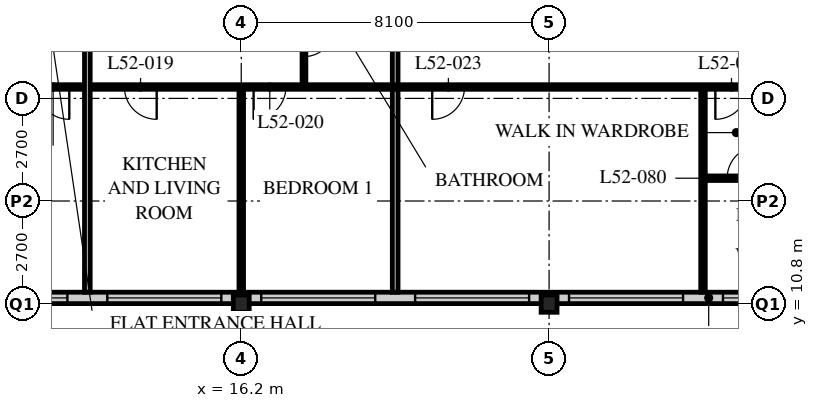
"""IFC4 building model, lengths in metres.
Left out: names, types, materials, properties, quantities, classifications, styles, units other than length and angle.
Written with IfcOpenShell. Run it as: python <this file> out.ifc"""

import sys

from ifc_helpers import new_model, si_unit, direction, frame, frame_2d, origin, origin_2d, place, context, subcontext, project, spatial, rectangle, i_section, extrude, element, fill, save


model = new_model("IFC4")
c1 = context("Model", 3, precision=1e-05, world=origin(), true_north=direction((0.0, 1.0)))
c2 = subcontext(c1, "Body", "Model", "MODEL_VIEW")
j1 = project(units=[si_unit("LENGTHUNIT", "METRE"), si_unit("PLANEANGLEUNIT", "RADIAN")], contexts=[c1])
p1 = place(None, origin())
s1 = spatial("IfcSite", under=j1, at=p1, CompositionType="ELEMENT")
p2 = place(p1, origin())
s2 = spatial("IfcBuilding", under=s1, at=p2, CompositionType="ELEMENT")
p3 = place(p2, frame((0.0, 0.0, 202.8)))
s3 = spatial("IfcBuildingStorey", under=s2, at=p3, CompositionType="ELEMENT", Elevation=202.8)
for number, where, z_axis, x_axis in (
    (1, (16.2, 10.8, 0.0), (0.0, 0.0, 1.0), (1.0, 0.0, 0.0)),
    (2, (24.3, 10.8, 0.0), (0.0, 0.0, 1.0), (1.0, 0.0, 0.0)),
):
    element("IfcColumn", number, at=place(p3, frame(where, z_axis=z_axis, x_axis=x_axis)), inside=s3, PredefinedType="COLUMN", context=c2, shape_type="SweptSolid", body=[
        extrude(i_section(OverallWidth=0.418, OverallDepth=0.456, WebThickness=0.042, FlangeThickness=0.067, FilletRadius=0.015, at=origin_2d()), origin(), (0.0, 0.0, 1.0), 3.6),
    ])
p4 = place(p3, frame((8.4, 10.95, 0.0), z_axis=(0.0, 0.0, 1.0), x_axis=(1.0, 0.0, 0.0)))
e3 = element("IfcWall", 3, at=p4, inside=s3, PredefinedType="SOLIDWALL", context=c2, shape_type="SweptSolid", body=[
    extrude(rectangle(XDim=40.2, YDim=0.3, at=frame_2d((20.1, 0.0))), origin(), (0.0, 0.0, 1.0), 3.39),
])
p5 = place(p4, frame((0.225, 0.0, 0.6)))
e4 = element("IfcOpeningElement", 4, at=p5, cuts=e3, PredefinedType="OPENING", context=c2, shape_type="SweptSolid", body=[
    extrude(rectangle(XDim=3.0, YDim=2.4, at=frame_2d((1.5, 1.2))), frame((0.0, 0.16, 0.0), z_axis=(0.0, -1.0, 0.0), x_axis=(1.0, 0.0, 0.0)), (0.0, 0.0, 1.0), 0.32),
])
p6 = place(p4, frame((4.275, 0.0, 0.6)))
e5 = element("IfcOpeningElement", 5, at=p6, cuts=e3, PredefinedType="OPENING", context=c2, shape_type="SweptSolid", body=[
    extrude(rectangle(XDim=3.0, YDim=2.4, at=frame_2d((1.5, 1.2))), frame((0.0, 0.16, 0.0), z_axis=(0.0, -1.0, 0.0), x_axis=(1.0, 0.0, 0.0)), (0.0, 0.0, 1.0), 0.32),
])
p7 = place(p4, frame((8.325, 0.0, 0.6)))
e6 = element("IfcOpeningElement", 6, at=p7, cuts=e3, PredefinedType="OPENING", context=c2, shape_type="SweptSolid", body=[
    extrude(rectangle(XDim=3.0, YDim=2.4, at=frame_2d((1.5, 1.2))), frame((0.0, 0.16, 0.0), z_axis=(0.0, -1.0, 0.0), x_axis=(1.0, 0.0, 0.0)), (0.0, 0.0, 1.0), 0.32),
])
p8 = place(p4, frame((12.375, 0.0, 0.6)))
e7 = element("IfcOpeningElement", 7, at=p8, cuts=e3, PredefinedType="OPENING", context=c2, shape_type="SweptSolid", body=[
    extrude(rectangle(XDim=3.0, YDim=2.4, at=frame_2d((1.5, 1.2))), frame((0.0, 0.16, 0.0), z_axis=(0.0, -1.0, 0.0), x_axis=(1.0, 0.0, 0.0)), (0.0, 0.0, 1.0), 0.32),
])
p9 = place(p4, frame((16.425, 0.0, 0.6)))
e8 = element("IfcOpeningElement", 8, at=p9, cuts=e3, PredefinedType="OPENING", context=c2, shape_type="SweptSolid", body=[
    extrude(rectangle(XDim=3.0, YDim=2.4, at=frame_2d((1.5, 1.2))), frame((0.0, 0.16, 0.0), z_axis=(0.0, -1.0, 0.0), x_axis=(1.0, 0.0, 0.0)), (0.0, 0.0, 1.0), 0.32),
])
p10 = place(p4, frame((20.475, 0.0, 0.6)))
e9 = element("IfcOpeningElement", 9, at=p10, cuts=e3, PredefinedType="OPENING", context=c2, shape_type="SweptSolid", body=[
    extrude(rectangle(XDim=3.0, YDim=2.4, at=frame_2d((1.5, 1.2))), frame((0.0, 0.16, 0.0), z_axis=(0.0, -1.0, 0.0), x_axis=(1.0, 0.0, 0.0)), (0.0, 0.0, 1.0), 0.32),
])
p11 = place(p4, frame((24.525, 0.0, 0.6)))
e10 = element("IfcOpeningElement", 10, at=p11, cuts=e3, PredefinedType="OPENING", context=c2, shape_type="SweptSolid", body=[
    extrude(rectangle(XDim=3.0, YDim=2.4, at=frame_2d((1.5, 1.2))), frame((0.0, 0.16, 0.0), z_axis=(0.0, -1.0, 0.0), x_axis=(1.0, 0.0, 0.0)), (0.0, 0.0, 1.0), 0.32),
])
p12 = place(p4, frame((28.575, 0.0, 0.6)))
e11 = element("IfcOpeningElement", 11, at=p12, cuts=e3, PredefinedType="OPENING", context=c2, shape_type="SweptSolid", body=[
    extrude(rectangle(XDim=3.0, YDim=2.4, at=frame_2d((1.5, 1.2))), frame((0.0, 0.16, 0.0), z_axis=(0.0, -1.0, 0.0), x_axis=(1.0, 0.0, 0.0)), (0.0, 0.0, 1.0), 0.32),
])
p13 = place(p4, frame((32.625, 0.0, 0.6)))
e12 = element("IfcOpeningElement", 12, at=p13, cuts=e3, PredefinedType="OPENING", context=c2, shape_type="SweptSolid", body=[
    extrude(rectangle(XDim=3.0, YDim=2.4, at=frame_2d((1.5, 1.2))), frame((0.0, 0.16, 0.0), z_axis=(0.0, -1.0, 0.0), x_axis=(1.0, 0.0, 0.0)), (0.0, 0.0, 1.0), 0.32),
])
p14 = place(p4, frame((36.675, 0.0, 0.6)))
e13 = element("IfcOpeningElement", 13, at=p14, cuts=e3, PredefinedType="OPENING", context=c2, shape_type="SweptSolid", body=[
    extrude(rectangle(XDim=3.0, YDim=2.4, at=frame_2d((1.5, 1.2))), frame((0.0, 0.16, 0.0), z_axis=(0.0, -1.0, 0.0), x_axis=(1.0, 0.0, 0.0)), (0.0, 0.0, 1.0), 0.32),
])
p15 = place(p3, frame((17.85, 18.9, 0.0), z_axis=(0.0, 0.0, 1.0), x_axis=(0.0, -1.0, 0.0)))
e14 = element("IfcWall", 14, at=p15, inside=s3, PredefinedType="PARTITIONING", context=c2, shape_type="SweptSolid", body=[
    extrude(rectangle(XDim=2.4, YDim=0.1, at=frame_2d((1.2, 0.0))), origin(), (0.0, 0.0, 1.0), 3.39),
])
p16 = place(p15, frame((0.8, 0.0, 0.0)))
e15 = element("IfcOpeningElement", 15, at=p16, cuts=e14, PredefinedType="OPENING", context=c2, shape_type="SweptSolid", body=[
    extrude(rectangle(XDim=0.8, YDim=2.1, at=frame_2d((0.4, 1.05))), frame((0.0, 0.06, 0.0), z_axis=(0.0, -1.0, 0.0), x_axis=(1.0, 0.0, 0.0)), (0.0, 0.0, 1.0), 0.12),
])
p17 = place(p3, frame((16.2, 16.5, 0.0), z_axis=(0.0, 0.0, 1.0), x_axis=(0.0, -1.0, 0.0)))
e16 = element("IfcWall", 16, at=p17, inside=s3, PredefinedType="PARTITIONING", context=c2, shape_type="SweptSolid", body=[
    extrude(rectangle(XDim=5.4, YDim=0.12, at=frame_2d((2.7, 0.0))), origin(), (0.0, 0.0, 1.0), 2.778),
])
p18 = place(p3, frame((20.25, 18.9, 0.0), z_axis=(0.0, 0.0, 1.0), x_axis=(0.0, -1.0, 0.0)))
e17 = element("IfcWall", 17, at=p18, inside=s3, PredefinedType="PARTITIONING", context=c2, shape_type="SweptSolid", body=[
    extrude(rectangle(XDim=7.8, YDim=0.15, at=frame_2d((3.9, 0.0))), origin(), (0.0, 0.0, 1.0), 3.39),
])
p19 = place(p3, frame((28.35, 16.5, 0.0), z_axis=(0.0, 0.0, 1.0), x_axis=(0.0, -1.0, 0.0)))
e18 = element("IfcWall", 18, at=p19, inside=s3, PredefinedType="PARTITIONING", context=c2, shape_type="SweptSolid", body=[
    extrude(rectangle(XDim=5.4, YDim=0.12, at=frame_2d((2.7, 0.0))), origin(), (0.0, 0.0, 1.0), 3.39),
])
p20 = place(p3, frame((8.1, 16.5, 0.0), z_axis=(0.0, 0.0, 1.0), x_axis=(1.0, 0.0, 0.0)))
e19 = element("IfcWall", 19, at=p20, inside=s3, PredefinedType="PARTITIONING", context=c2, shape_type="SweptSolid", body=[
    extrude(rectangle(XDim=28.35, YDim=0.12, at=frame_2d((14.175, 0.0))), origin(), (0.0, 0.0, 1.0), 3.39),
])
p21 = place(p20, frame((5.025, 0.0, 0.0)))
e20 = element("IfcOpeningElement", 20, at=p21, cuts=e19, PredefinedType="OPENING", context=c2, shape_type="SweptSolid", body=[
    extrude(rectangle(XDim=0.85, YDim=2.1, at=frame_2d((0.425, 1.05))), frame((0.0, 0.07, 0.0), z_axis=(0.0, -1.0, 0.0), x_axis=(1.0, 0.0, 0.0)), (0.0, 0.0, 1.0), 0.14),
])
p22 = place(p20, frame((8.425, 0.0, 0.0)))
e21 = element("IfcOpeningElement", 21, at=p22, cuts=e19, PredefinedType="OPENING", context=c2, shape_type="SweptSolid", body=[
    extrude(rectangle(XDim=0.85, YDim=2.1, at=frame_2d((0.425, 1.05))), frame((0.0, 0.07, 0.0), z_axis=(0.0, -1.0, 0.0), x_axis=(1.0, 0.0, 0.0)), (0.0, 0.0, 1.0), 0.14),
])
p23 = place(p20, frame((13.125, 0.0, 0.0)))
e22 = element("IfcOpeningElement", 22, at=p23, cuts=e19, PredefinedType="OPENING", context=c2, shape_type="SweptSolid", body=[
    extrude(rectangle(XDim=0.85, YDim=2.1, at=frame_2d((0.425, 1.05))), frame((0.0, 0.07, 0.0), z_axis=(0.0, -1.0, 0.0), x_axis=(1.0, 0.0, 0.0)), (0.0, 0.0, 1.0), 0.14),
])
p24 = place(p20, frame((20.575, 0.0, 0.0)))
e23 = element("IfcOpeningElement", 23, at=p24, cuts=e19, PredefinedType="OPENING", context=c2, shape_type="SweptSolid", body=[
    extrude(rectangle(XDim=0.85, YDim=2.1, at=frame_2d((0.425, 1.05))), frame((0.0, 0.07, 0.0), z_axis=(0.0, -1.0, 0.0), x_axis=(1.0, 0.0, 0.0)), (0.0, 0.0, 1.0), 0.14),
])
p25 = place(p20, frame((24.625, 0.0, 0.0)))
e24 = element("IfcOpeningElement", 24, at=p25, cuts=e19, PredefinedType="OPENING", context=c2, shape_type="SweptSolid", body=[
    extrude(rectangle(XDim=0.85, YDim=2.1, at=frame_2d((0.425, 1.05))), frame((0.0, 0.07, 0.0), z_axis=(0.0, -1.0, 0.0), x_axis=(1.0, 0.0, 0.0)), (0.0, 0.0, 1.0), 0.14),
])
p26 = place(p20, frame((2.725, 0.0, 0.0)))
e25 = element("IfcOpeningElement", 25, at=p26, cuts=e19, PredefinedType="OPENING", context=c2, shape_type="SweptSolid", body=[
    extrude(rectangle(XDim=0.85, YDim=2.1, at=frame_2d((0.425, 1.05))), frame((0.0, 0.07, 0.0), z_axis=(0.0, -1.0, 0.0), x_axis=(1.0, 0.0, 0.0)), (0.0, 0.0, 1.0), 0.14),
])
p27 = place(p3, frame((12.15, 18.9, 0.0), z_axis=(0.0, 0.0, 1.0), x_axis=(0.0, -1.0, 0.0)))
e26 = element("IfcWall", 26, at=p27, inside=s3, PredefinedType="PARTITIONING", context=c2, shape_type="SweptSolid", body=[
    extrude(rectangle(XDim=7.8, YDim=0.15, at=frame_2d((3.9, 0.0))), origin(), (0.0, 0.0, 1.0), 3.39),
])
p28 = place(p3, frame((30.11, 14.1, 0.0), z_axis=(0.0, 0.0, 1.0), x_axis=(-1.0, 0.0, 0.0)))
e27 = element("IfcWall", 27, at=p28, inside=s3, PredefinedType="PARTITIONING", context=c2, shape_type="SweptSolid", body=[
    extrude(rectangle(XDim=1.76, YDim=0.12, at=frame_2d((0.88, 0.0))), origin(), (0.0, 0.0, 1.0), 3.39),
])
p29 = place(p28, frame((0.275, 0.0, 0.0)))
e28 = element("IfcOpeningElement", 28, at=p29, cuts=e27, PredefinedType="OPENING", context=c2, shape_type="SweptSolid", body=[
    extrude(rectangle(XDim=0.85, YDim=2.1, at=frame_2d((0.425, 1.05))), frame((0.0, 0.07, 0.0), z_axis=(0.0, -1.0, 0.0), x_axis=(1.0, 0.0, 0.0)), (0.0, 0.0, 1.0), 0.14),
])
p30 = place(p5, origin())
e29 = element("IfcWindow", 29, at=p30, inside=s3, PartitioningType="SINGLE_PANEL", PredefinedType="WINDOW", context=c2, shape_type="SweptSolid", body=[
    extrude(rectangle(XDim=3.0, YDim=2.4, at=frame_2d((1.5, 1.2))), frame((0.0, 0.03, 0.0), z_axis=(0.0, -1.0, 0.0), x_axis=(1.0, 0.0, 0.0)), (0.0, 0.0, 1.0), 0.06),
])
fill(e4, e29)
p31 = place(p6, origin())
e30 = element("IfcWindow", 30, at=p31, inside=s3, PartitioningType="SINGLE_PANEL", PredefinedType="WINDOW", context=c2, shape_type="SweptSolid", body=[
    extrude(rectangle(XDim=3.0, YDim=2.4, at=frame_2d((1.5, 1.2))), frame((0.0, 0.03, 0.0), z_axis=(0.0, -1.0, 0.0), x_axis=(1.0, 0.0, 0.0)), (0.0, 0.0, 1.0), 0.06),
])
fill(e5, e30)
p32 = place(p7, origin())
e31 = element("IfcWindow", 31, at=p32, inside=s3, PartitioningType="SINGLE_PANEL", PredefinedType="WINDOW", context=c2, shape_type="SweptSolid", body=[
    extrude(rectangle(XDim=3.0, YDim=2.4, at=frame_2d((1.5, 1.2))), frame((0.0, 0.03, 0.0), z_axis=(0.0, -1.0, 0.0), x_axis=(1.0, 0.0, 0.0)), (0.0, 0.0, 1.0), 0.06),
])
fill(e6, e31)
p33 = place(p8, origin())
e32 = element("IfcWindow", 32, at=p33, inside=s3, PartitioningType="SINGLE_PANEL", PredefinedType="WINDOW", context=c2, shape_type="SweptSolid", body=[
    extrude(rectangle(XDim=3.0, YDim=2.4, at=frame_2d((1.5, 1.2))), frame((0.0, 0.03, 0.0), z_axis=(0.0, -1.0, 0.0), x_axis=(1.0, 0.0, 0.0)), (0.0, 0.0, 1.0), 0.06),
])
fill(e7, e32)
p34 = place(p9, origin())
e33 = element("IfcWindow", 33, at=p34, inside=s3, PartitioningType="SINGLE_PANEL", PredefinedType="WINDOW", context=c2, shape_type="SweptSolid", body=[
    extrude(rectangle(XDim=3.0, YDim=2.4, at=frame_2d((1.5, 1.2))), frame((0.0, 0.03, 0.0), z_axis=(0.0, -1.0, 0.0), x_axis=(1.0, 0.0, 0.0)), (0.0, 0.0, 1.0), 0.06),
])
fill(e8, e33)
p35 = place(p10, origin())
e34 = element("IfcWindow", 34, at=p35, inside=s3, PartitioningType="SINGLE_PANEL", PredefinedType="WINDOW", context=c2, shape_type="SweptSolid", body=[
    extrude(rectangle(XDim=3.0, YDim=2.4, at=frame_2d((1.5, 1.2))), frame((0.0, 0.03, 0.0), z_axis=(0.0, -1.0, 0.0), x_axis=(1.0, 0.0, 0.0)), (0.0, 0.0, 1.0), 0.06),
])
fill(e9, e34)
p36 = place(p16, origin())
e35 = element("IfcDoor", 35, at=p36, inside=s3, OperationType="SINGLE_SWING_LEFT", PredefinedType="DOOR", context=c2, shape_type="SweptSolid", body=[
    extrude(rectangle(XDim=0.8, YDim=2.1, at=frame_2d((0.4, 1.05))), frame((0.0, 0.025, 0.0), z_axis=(0.0, -1.0, 0.0), x_axis=(1.0, 0.0, 0.0)), (0.0, 0.0, 1.0), 0.05),
])
fill(e15, e35)
p37 = place(p21, origin())
e36 = element("IfcDoor", 36, at=p37, inside=s3, OperationType="SINGLE_SWING_LEFT", PredefinedType="DOOR", context=c2, shape_type="SweptSolid", body=[
    extrude(rectangle(XDim=0.85, YDim=2.1, at=frame_2d((0.425, 1.05))), frame((0.0, 0.025, 0.0), z_axis=(0.0, -1.0, 0.0), x_axis=(1.0, 0.0, 0.0)), (0.0, 0.0, 1.0), 0.05),
])
fill(e20, e36)
p38 = place(p22, origin())
e37 = element("IfcDoor", 37, at=p38, inside=s3, OperationType="SINGLE_SWING_RIGHT", PredefinedType="DOOR", context=c2, shape_type="SweptSolid", body=[
    extrude(rectangle(XDim=0.85, YDim=2.1, at=frame_2d((0.425, 1.05))), frame((0.0, 0.025, 0.0), z_axis=(0.0, -1.0, 0.0), x_axis=(1.0, 0.0, 0.0)), (0.0, 0.0, 1.0), 0.05),
])
fill(e21, e37)
p39 = place(p23, origin())
e38 = element("IfcDoor", 38, at=p39, inside=s3, OperationType="SINGLE_SWING_RIGHT", PredefinedType="DOOR", context=c2, shape_type="SweptSolid", body=[
    extrude(rectangle(XDim=0.85, YDim=2.1, at=frame_2d((0.425, 1.05))), frame((0.0, 0.025, 0.0), z_axis=(0.0, -1.0, 0.0), x_axis=(1.0, 0.0, 0.0)), (0.0, 0.0, 1.0), 0.05),
])
fill(e22, e38)
p40 = place(p24, origin())
e39 = element("IfcDoor", 39, at=p40, inside=s3, OperationType="SINGLE_SWING_RIGHT", PredefinedType="DOOR", context=c2, shape_type="SweptSolid", body=[
    extrude(rectangle(XDim=0.85, YDim=2.1, at=frame_2d((0.425, 1.05))), frame((0.0, 0.025, 0.0), z_axis=(0.0, -1.0, 0.0), x_axis=(1.0, 0.0, 0.0)), (0.0, 0.0, 1.0), 0.05),
])
fill(e23, e39)
p41 = place(p26, origin())
e40 = element("IfcDoor", 40, at=p41, inside=s3, OperationType="SINGLE_SWING_LEFT", PredefinedType="DOOR", context=c2, shape_type="SweptSolid", body=[
    extrude(rectangle(XDim=0.85, YDim=2.1, at=frame_2d((0.425, 1.05))), frame((0.0, 0.025, 0.0), z_axis=(0.0, -1.0, 0.0), x_axis=(1.0, 0.0, 0.0)), (0.0, 0.0, 1.0), 0.05),
])
fill(e25, e40)
p42 = place(p29, origin())
e41 = element("IfcDoor", 41, at=p42, inside=s3, OperationType="SINGLE_SWING_RIGHT", PredefinedType="DOOR", context=c2, shape_type="SweptSolid", body=[
    extrude(rectangle(XDim=0.85, YDim=2.1, at=frame_2d((0.425, 1.05))), frame((0.0, 0.025, 0.0), z_axis=(0.0, -1.0, 0.0), x_axis=(1.0, 0.0, 0.0)), (0.0, 0.0, 1.0), 0.05),
])
fill(e28, e41)
save(model, sys.argv[1])
